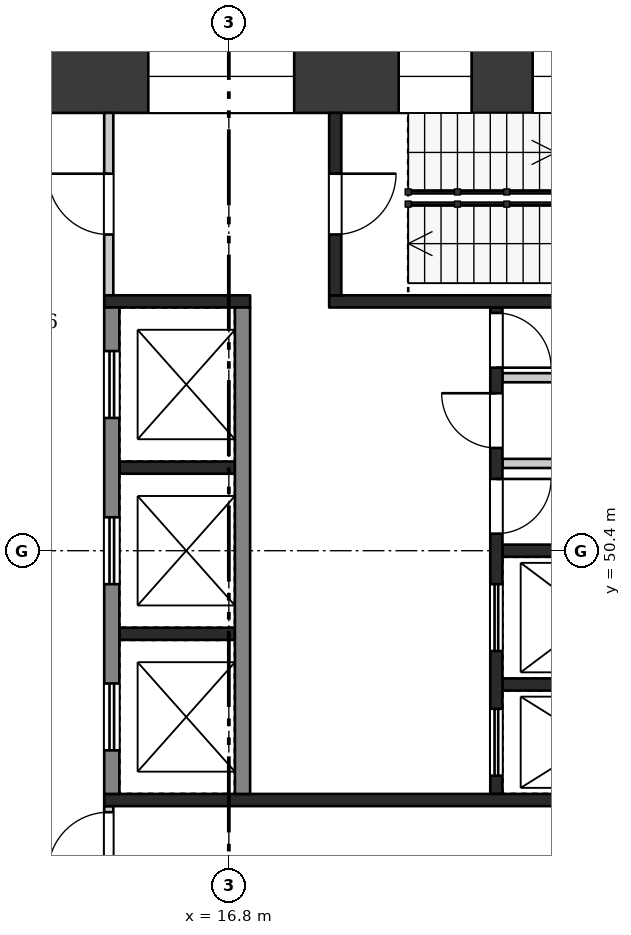
"""IFC4 building model, lengths in metres.
Left out: names, types, materials, properties, quantities, classifications, styles, units other than length and angle.
Written with IfcOpenShell. Run it as: python <this file> out.ifc"""

import sys

from ifc_helpers import new_model, si_unit, direction, frame, frame_2d, origin, place, context, subcontext, project, spatial, rectangle, extrude, element, fill, save


model = new_model("IFC4")
c1 = context("Model", 3, precision=1e-05, world=origin(), true_north=direction((0.0, 1.0)))
c2 = subcontext(c1, "Body", "Model", "MODEL_VIEW")
j1 = project(units=[si_unit("LENGTHUNIT", "METRE"), si_unit("PLANEANGLEUNIT", "RADIAN")], contexts=[c1])
p1 = place(None, origin())
s1 = spatial("IfcSite", under=j1, at=p1, CompositionType="ELEMENT")
p2 = place(p1, origin())
s2 = spatial("IfcBuilding", under=s1, at=p2, CompositionType="ELEMENT")
p3 = place(p2, frame((0.0, 0.0, 214.2)))
s3 = spatial("IfcBuildingStorey", under=s2, at=p3, CompositionType="ELEMENT", Elevation=214.2)
p4 = place(p3, frame((9.6, 58.2, 0.0), z_axis=(0.0, 0.0, 1.0), x_axis=(1.0, 0.0, 0.0)))
e1 = element("IfcWall", 1, at=p4, inside=s3, PredefinedType="SHEAR", context=c2, shape_type="SweptSolid", body=[
    extrude(rectangle(XDim=14.4, YDim=1.2, at=frame_2d((7.2, 0.0))), origin(), (0.0, 0.0, 1.0), 3.22),
])
p5 = place(p4, frame((1.105, 0.0, 0.6)))
e2 = element("IfcOpeningElement", 2, at=p5, cuts=e1, PredefinedType="OPENING", context=c2, shape_type="SweptSolid", body=[
    extrude(rectangle(XDim=3.0, YDim=2.1, at=frame_2d((1.5, 1.05))), frame((0.0, 0.61, 0.0), z_axis=(0.0, -1.0, 0.0), x_axis=(1.0, 0.0, 0.0)), (0.0, 0.0, 1.0), 1.22),
])
p6 = place(p4, frame((5.875, 0.0, 0.6)))
e3 = element("IfcOpeningElement", 3, at=p6, cuts=e1, PredefinedType="OPENING", context=c2, shape_type="SweptSolid", body=[
    extrude(rectangle(XDim=2.4, YDim=2.1, at=frame_2d((1.2, 1.05))), frame((0.0, 0.61, 0.0), z_axis=(0.0, -1.0, 0.0), x_axis=(1.0, 0.0, 0.0)), (0.0, 0.0, 1.0), 1.22),
])
p7 = place(p4, frame((9.993, 0.0, 0.5)))
e4 = element("IfcOpeningElement", 4, at=p7, cuts=e1, PredefinedType="OPENING", context=c2, shape_type="SweptSolid", body=[
    extrude(rectangle(XDim=1.2, YDim=2.4, at=frame_2d((0.6, 1.2))), frame((0.0, 0.61, 0.0), z_axis=(0.0, -1.0, 0.0), x_axis=(1.0, 0.0, 0.0)), (0.0, 0.0, 1.0), 1.22),
])
p8 = place(p4, frame((12.197, 0.0, 0.5)))
e5 = element("IfcOpeningElement", 5, at=p8, cuts=e1, PredefinedType="OPENING", context=c2, shape_type="SweptSolid", body=[
    extrude(rectangle(XDim=1.2, YDim=2.4, at=frame_2d((0.6, 1.2))), frame((0.0, 0.61, 0.0), z_axis=(0.0, -1.0, 0.0), x_axis=(1.0, 0.0, 0.0)), (0.0, 0.0, 1.0), 1.22),
])
for number, where, z_axis, x_axis in (
    (6, (15.0, 51.767, 0.0), (0.0, 0.0, 1.0), (1.0, 0.0, 0.0)),
    (7, (15.0, 49.033, 0.0), (0.0, 0.0, 1.0), (1.0, 0.0, 0.0)),
):
    element("IfcWall", number, at=place(p3, frame(where, z_axis=z_axis, x_axis=x_axis)), inside=s3, PredefinedType="SHEAR", context=c2, shape_type="SweptSolid", body=[
        extrude(rectangle(XDim=1.9, YDim=0.2, at=frame_2d((0.95, 0.0))), origin(), (0.0, 0.0, 1.0), 3.22),
    ])
p9 = place(p3, frame((14.875, 54.4, 0.0), z_axis=(0.0, 0.0, 1.0), x_axis=(0.0, -1.0, 0.0)))
e8 = element("IfcWall", 8, at=p9, inside=s3, PredefinedType="SHEAR", context=c2, shape_type="SweptSolid", body=[
    extrude(rectangle(XDim=8.0, YDim=0.25, at=frame_2d((4.0, 0.0))), origin(), (0.0, 0.0, 1.0), 3.22),
])
p10 = place(p9, frame((0.717, 0.0, 0.0)))
e9 = element("IfcOpeningElement", 9, at=p10, cuts=e8, PredefinedType="OPENING", context=c2, shape_type="SweptSolid", body=[
    extrude(rectangle(XDim=1.1, YDim=2.1, at=frame_2d((0.55, 1.05))), frame((0.0, 0.135, 0.0), z_axis=(0.0, -1.0, 0.0), x_axis=(1.0, 0.0, 0.0)), (0.0, 0.0, 1.0), 0.27),
])
p11 = place(p9, frame((3.45, 0.0, 0.0)))
e10 = element("IfcOpeningElement", 10, at=p11, cuts=e8, PredefinedType="OPENING", context=c2, shape_type="SweptSolid", body=[
    extrude(rectangle(XDim=1.1, YDim=2.1, at=frame_2d((0.55, 1.05))), frame((0.0, 0.135, 0.0), z_axis=(0.0, -1.0, 0.0), x_axis=(1.0, 0.0, 0.0)), (0.0, 0.0, 1.0), 0.27),
])
p12 = place(p9, frame((6.183, 0.0, 0.0)))
e11 = element("IfcOpeningElement", 11, at=p12, cuts=e8, PredefinedType="OPENING", context=c2, shape_type="SweptSolid", body=[
    extrude(rectangle(XDim=1.1, YDim=2.1, at=frame_2d((0.55, 1.05))), frame((0.0, 0.135, 0.0), z_axis=(0.0, -1.0, 0.0), x_axis=(1.0, 0.0, 0.0)), (0.0, 0.0, 1.0), 0.27),
])
p13 = place(p3, frame((17.025, 54.4, 0.0), z_axis=(0.0, 0.0, 1.0), x_axis=(0.0, -1.0, 0.0)))
e12 = element("IfcWall", 12, at=p13, inside=s3, PredefinedType="SHEAR", context=c2, shape_type="SweptSolid", body=[
    extrude(rectangle(XDim=8.0, YDim=0.25, at=frame_2d((4.0, 0.0))), origin(), (0.0, 0.0, 1.0), 3.22),
])
for number, where, z_axis, x_axis in (
    (13, (21.3, 50.4, 0.0), (0.0, 0.0, 1.0), (1.0, 0.0, 0.0)),
    (14, (21.3, 48.2, 0.0), (0.0, 0.0, 1.0), (1.0, 0.0, 0.0)),
):
    element("IfcWall", number, at=place(p3, frame(where, z_axis=z_axis, x_axis=x_axis)), inside=s3, PredefinedType="SHEAR", context=c2, shape_type="SweptSolid", body=[
        extrude(rectangle(XDim=2.7, YDim=0.2, at=frame_2d((1.35, 0.0))), origin(), (0.0, 0.0, 1.0), 3.22),
    ])
for number, where, z_axis, x_axis in (
    (15, (21.3, 53.245, 0.0), (0.0, 0.0, 1.0), (1.0, 0.0, 0.0)),
    (16, (21.3, 51.835, 0.0), (0.0, 0.0, 1.0), (1.0, 0.0, 0.0)),
):
    element("IfcWall", number, at=place(p3, frame(where, z_axis=z_axis, x_axis=x_axis)), inside=s3, PredefinedType="PARTITIONING", context=c2, shape_type="SweptSolid", body=[
        extrude(rectangle(XDim=2.7, YDim=0.15, at=frame_2d((1.35, 0.0))), origin(), (0.0, 0.0, 1.0), 3.22),
    ])
p14 = place(p3, frame((21.2, 54.4, 0.0), z_axis=(0.0, 0.0, 1.0), x_axis=(0.0, -1.0, 0.0)))
e17 = element("IfcWall", 17, at=p14, inside=s3, PredefinedType="SHEAR", context=c2, shape_type="SweptSolid", body=[
    extrude(rectangle(XDim=8.0, YDim=0.2, at=frame_2d((4.0, 0.0))), origin(), (0.0, 0.0, 1.0), 3.22),
])
p15 = place(p14, frame((0.09, 0.0, 0.0)))
e18 = element("IfcOpeningElement", 18, at=p15, cuts=e17, PredefinedType="OPENING", context=c2, shape_type="SweptSolid", body=[
    extrude(rectangle(XDim=0.9, YDim=2.1, at=frame_2d((0.45, 1.05))), frame((0.0, 0.11, 0.0), z_axis=(0.0, -1.0, 0.0), x_axis=(1.0, 0.0, 0.0)), (0.0, 0.0, 1.0), 0.22),
])
p16 = place(p14, frame((1.41, 0.0, 0.0)))
e19 = element("IfcOpeningElement", 19, at=p16, cuts=e17, PredefinedType="OPENING", context=c2, shape_type="SweptSolid", body=[
    extrude(rectangle(XDim=0.9, YDim=2.1, at=frame_2d((0.45, 1.05))), frame((0.0, 0.11, 0.0), z_axis=(0.0, -1.0, 0.0), x_axis=(1.0, 0.0, 0.0)), (0.0, 0.0, 1.0), 0.22),
])
p17 = place(p14, frame((2.82, 0.0, 0.0)))
e20 = element("IfcOpeningElement", 20, at=p17, cuts=e17, PredefinedType="OPENING", context=c2, shape_type="SweptSolid", body=[
    extrude(rectangle(XDim=0.9, YDim=2.1, at=frame_2d((0.45, 1.05))), frame((0.0, 0.11, 0.0), z_axis=(0.0, -1.0, 0.0), x_axis=(1.0, 0.0, 0.0)), (0.0, 0.0, 1.0), 0.22),
])
p18 = place(p14, frame((4.55, 0.0, 0.0)))
e21 = element("IfcOpeningElement", 21, at=p18, cuts=e17, PredefinedType="OPENING", context=c2, shape_type="SweptSolid", body=[
    extrude(rectangle(XDim=1.1, YDim=2.1, at=frame_2d((0.55, 1.05))), frame((0.0, 0.11, 0.0), z_axis=(0.0, -1.0, 0.0), x_axis=(1.0, 0.0, 0.0)), (0.0, 0.0, 1.0), 0.22),
])
p19 = place(p14, frame((6.6, 0.0, 0.0)))
e22 = element("IfcOpeningElement", 22, at=p19, cuts=e17, PredefinedType="OPENING", context=c2, shape_type="SweptSolid", body=[
    extrude(rectangle(XDim=1.1, YDim=2.1, at=frame_2d((0.55, 1.05))), frame((0.0, 0.11, 0.0), z_axis=(0.0, -1.0, 0.0), x_axis=(1.0, 0.0, 0.0)), (0.0, 0.0, 1.0), 0.22),
])
p20 = place(p3, frame((14.75, 54.5, 0.0), z_axis=(0.0, 0.0, 1.0), x_axis=(1.0, 0.0, 0.0)))
e23 = element("IfcWall", 23, at=p20, inside=s3, PredefinedType="SHEAR", context=c2, shape_type="SweptSolid", body=[
    extrude(rectangle(XDim=2.4, YDim=0.2, at=frame_2d((1.2, 0.0))), origin(), (0.0, 0.0, 1.0), 3.22),
])
p21 = place(p3, frame((18.45, 54.5, 0.0), z_axis=(0.0, 0.0, 1.0), x_axis=(1.0, 0.0, 0.0)))
e24 = element("IfcWall", 24, at=p21, inside=s3, PredefinedType="SHEAR", context=c2, shape_type="SweptSolid", body=[
    extrude(rectangle(XDim=5.55, YDim=0.2, at=frame_2d((2.775, 0.0))), origin(), (0.0, 0.0, 1.0), 3.22),
])
p22 = place(p3, frame((14.825, 57.6, 0.0), z_axis=(0.0, 0.0, 1.0), x_axis=(0.0, -1.0, 0.0)))
e25 = element("IfcWall", 25, at=p22, inside=s3, PredefinedType="PARTITIONING", context=c2, shape_type="SweptSolid", body=[
    extrude(rectangle(XDim=3.0, YDim=0.15, at=frame_2d((1.5, 0.0))), origin(), (0.0, 0.0, 1.0), 3.22),
])
p23 = place(p22, frame((1.0, 0.0, 0.0)))
e26 = element("IfcOpeningElement", 26, at=p23, cuts=e25, PredefinedType="OPENING", context=c2, shape_type="SweptSolid", body=[
    extrude(rectangle(XDim=1.0, YDim=2.1, at=frame_2d((0.5, 1.05))), frame((0.0, 0.085, 0.0), z_axis=(0.0, -1.0, 0.0), x_axis=(1.0, 0.0, 0.0)), (0.0, 0.0, 1.0), 0.17),
])
p24 = place(p3, frame((18.55, 57.6, 0.0), z_axis=(0.0, 0.0, 1.0), x_axis=(0.0, -1.0, 0.0)))
e27 = element("IfcWall", 27, at=p24, inside=s3, PredefinedType="SHEAR", context=c2, shape_type="SweptSolid", body=[
    extrude(rectangle(XDim=3.0, YDim=0.2, at=frame_2d((1.5, 0.0))), origin(), (0.0, 0.0, 1.0), 3.22),
])
p25 = place(p24, frame((1.0, 0.0, 0.0)))
e28 = element("IfcOpeningElement", 28, at=p25, cuts=e27, PredefinedType="OPENING", context=c2, shape_type="SweptSolid", body=[
    extrude(rectangle(XDim=1.0, YDim=2.1, at=frame_2d((0.5, 1.05))), frame((0.0, 0.11, 0.0), z_axis=(0.0, -1.0, 0.0), x_axis=(1.0, 0.0, 0.0)), (0.0, 0.0, 1.0), 0.22),
])
p26 = place(p3, frame((14.75, 46.3, 0.0), z_axis=(0.0, 0.0, 1.0), x_axis=(1.0, 0.0, 0.0)))
e29 = element("IfcWall", 29, at=p26, inside=s3, PredefinedType="SHEAR", context=c2, shape_type="SweptSolid", body=[
    extrude(rectangle(XDim=9.25, YDim=0.2, at=frame_2d((4.625, 0.0))), origin(), (0.0, 0.0, 1.0), 3.22),
])
p27 = place(p3, frame((14.825, 46.2, 0.0), z_axis=(0.0, 0.0, 1.0), x_axis=(0.0, -1.0, 0.0)))
e30 = element("IfcWall", 30, at=p27, inside=s3, PredefinedType="PARTITIONING", context=c2, shape_type="SweptSolid", body=[
    extrude(rectangle(XDim=3.0, YDim=0.15, at=frame_2d((1.5, 0.0))), origin(), (0.0, 0.0, 1.0), 3.22),
])
p28 = place(p27, frame((0.1, 0.0, 0.0)))
e31 = element("IfcOpeningElement", 31, at=p28, cuts=e30, PredefinedType="OPENING", context=c2, shape_type="SweptSolid", body=[
    extrude(rectangle(XDim=1.0, YDim=2.1, at=frame_2d((0.5, 1.05))), frame((0.0, 0.085, 0.0), z_axis=(0.0, -1.0, 0.0), x_axis=(1.0, 0.0, 0.0)), (0.0, 0.0, 1.0), 0.17),
])
p29 = place(p10, origin())
e32 = element("IfcDoor", 32, at=p29, inside=s3, OperationType="DOUBLE_DOOR_SLIDING", PredefinedType="DOOR", context=c2, shape_type="SweptSolid", body=[
    extrude(rectangle(XDim=1.1, YDim=2.1, at=frame_2d((0.55, 1.05))), frame((0.0, 0.025, 0.0), z_axis=(0.0, -1.0, 0.0), x_axis=(1.0, 0.0, 0.0)), (0.0, 0.0, 1.0), 0.05),
])
fill(e9, e32)
p30 = place(p11, origin())
e33 = element("IfcDoor", 33, at=p30, inside=s3, OperationType="DOUBLE_DOOR_SLIDING", PredefinedType="DOOR", context=c2, shape_type="SweptSolid", body=[
    extrude(rectangle(XDim=1.1, YDim=2.1, at=frame_2d((0.55, 1.05))), frame((0.0, 0.025, 0.0), z_axis=(0.0, -1.0, 0.0), x_axis=(1.0, 0.0, 0.0)), (0.0, 0.0, 1.0), 0.05),
])
fill(e10, e33)
p31 = place(p12, origin())
e34 = element("IfcDoor", 34, at=p31, inside=s3, OperationType="DOUBLE_DOOR_SLIDING", PredefinedType="DOOR", context=c2, shape_type="SweptSolid", body=[
    extrude(rectangle(XDim=1.1, YDim=2.1, at=frame_2d((0.55, 1.05))), frame((0.0, 0.025, 0.0), z_axis=(0.0, -1.0, 0.0), x_axis=(1.0, 0.0, 0.0)), (0.0, 0.0, 1.0), 0.05),
])
fill(e11, e34)
p32 = place(p15, origin())
e35 = element("IfcDoor", 35, at=p32, inside=s3, OperationType="SINGLE_SWING_RIGHT", PredefinedType="DOOR", context=c2, shape_type="SweptSolid", body=[
    extrude(rectangle(XDim=0.9, YDim=2.1, at=frame_2d((0.45, 1.05))), frame((0.0, 0.025, 0.0), z_axis=(0.0, -1.0, 0.0), x_axis=(1.0, 0.0, 0.0)), (0.0, 0.0, 1.0), 0.05),
])
fill(e18, e35)
p33 = place(p16, frame((0.9, 0.0, 0.0), z_axis=(0.0, 0.0, 1.0), x_axis=(-1.0, 0.0, 0.0)))
e36 = element("IfcDoor", 36, at=p33, inside=s3, OperationType="SINGLE_SWING_RIGHT", PredefinedType="DOOR", context=c2, shape_type="SweptSolid", body=[
    extrude(rectangle(XDim=0.9, YDim=2.1, at=frame_2d((0.45, 1.05))), frame((0.0, 0.025, 0.0), z_axis=(0.0, -1.0, 0.0), x_axis=(1.0, 0.0, 0.0)), (0.0, 0.0, 1.0), 0.05),
])
fill(e19, e36)
p34 = place(p17, origin())
e37 = element("IfcDoor", 37, at=p34, inside=s3, OperationType="SINGLE_SWING_LEFT", PredefinedType="DOOR", context=c2, shape_type="SweptSolid", body=[
    extrude(rectangle(XDim=0.9, YDim=2.1, at=frame_2d((0.45, 1.05))), frame((0.0, 0.025, 0.0), z_axis=(0.0, -1.0, 0.0), x_axis=(1.0, 0.0, 0.0)), (0.0, 0.0, 1.0), 0.05),
])
fill(e20, e37)
p35 = place(p18, origin())
e38 = element("IfcDoor", 38, at=p35, inside=s3, OperationType="DOUBLE_DOOR_SLIDING", PredefinedType="DOOR", context=c2, shape_type="SweptSolid", body=[
    extrude(rectangle(XDim=1.1, YDim=2.1, at=frame_2d((0.55, 1.05))), frame((0.0, 0.025, 0.0), z_axis=(0.0, -1.0, 0.0), x_axis=(1.0, 0.0, 0.0)), (0.0, 0.0, 1.0), 0.05),
])
fill(e21, e38)
p36 = place(p19, origin())
e39 = element("IfcDoor", 39, at=p36, inside=s3, OperationType="DOUBLE_DOOR_SLIDING", PredefinedType="DOOR", context=c2, shape_type="SweptSolid", body=[
    extrude(rectangle(XDim=1.1, YDim=2.1, at=frame_2d((0.55, 1.05))), frame((0.0, 0.025, 0.0), z_axis=(0.0, -1.0, 0.0), x_axis=(1.0, 0.0, 0.0)), (0.0, 0.0, 1.0), 0.05),
])
fill(e22, e39)
p37 = place(p23, frame((1.0, 0.0, 0.0), z_axis=(0.0, 0.0, 1.0), x_axis=(-1.0, 0.0, 0.0)))
e40 = element("IfcDoor", 40, at=p37, inside=s3, OperationType="SINGLE_SWING_RIGHT", PredefinedType="DOOR", context=c2, shape_type="SweptSolid", body=[
    extrude(rectangle(XDim=1.0, YDim=2.1, at=frame_2d((0.5, 1.05))), frame((0.0, 0.025, 0.0), z_axis=(0.0, -1.0, 0.0), x_axis=(1.0, 0.0, 0.0)), (0.0, 0.0, 1.0), 0.05),
])
fill(e26, e40)
p38 = place(p25, origin())
e41 = element("IfcDoor", 41, at=p38, inside=s3, OperationType="SINGLE_SWING_LEFT", PredefinedType="DOOR", context=c2, shape_type="SweptSolid", body=[
    extrude(rectangle(XDim=1.0, YDim=2.1, at=frame_2d((0.5, 1.05))), frame((0.0, 0.025, 0.0), z_axis=(0.0, -1.0, 0.0), x_axis=(1.0, 0.0, 0.0)), (0.0, 0.0, 1.0), 0.05),
])
fill(e28, e41)
p39 = place(p28, frame((1.0, 0.0, 0.0), z_axis=(0.0, 0.0, 1.0), x_axis=(-1.0, 0.0, 0.0)))
e42 = element("IfcDoor", 42, at=p39, inside=s3, OperationType="SINGLE_SWING_LEFT", PredefinedType="DOOR", context=c2, shape_type="SweptSolid", body=[
    extrude(rectangle(XDim=1.0, YDim=2.1, at=frame_2d((0.5, 1.05))), frame((0.0, 0.025, 0.0), z_axis=(0.0, -1.0, 0.0), x_axis=(1.0, 0.0, 0.0)), (0.0, 0.0, 1.0), 0.05),
])
fill(e31, e42)
p40 = place(p6, origin())
e43 = element("IfcWindow", 43, at=p40, inside=s3, PartitioningType="SINGLE_PANEL", PredefinedType="WINDOW", context=c2, shape_type="SweptSolid", body=[
    extrude(rectangle(XDim=2.4, YDim=2.1, at=frame_2d((1.2, 1.05))), frame((0.0, 0.03, 0.0), z_axis=(0.0, -1.0, 0.0), x_axis=(1.0, 0.0, 0.0)), (0.0, 0.0, 1.0), 0.06),
])
fill(e3, e43)
p41 = place(p7, origin())
e44 = element("IfcWindow", 44, at=p41, inside=s3, PartitioningType="SINGLE_PANEL", PredefinedType="WINDOW", context=c2, shape_type="SweptSolid", body=[
    extrude(rectangle(XDim=1.2, YDim=2.4, at=frame_2d((0.6, 1.2))), frame((0.0, 0.03, 0.0), z_axis=(0.0, -1.0, 0.0), x_axis=(1.0, 0.0, 0.0)), (0.0, 0.0, 1.0), 0.06),
])
fill(e4, e44)
p42 = place(p8, origin())
e45 = element("IfcWindow", 45, at=p42, inside=s3, PartitioningType="SINGLE_PANEL", PredefinedType="WINDOW", context=c2, shape_type="SweptSolid", body=[
    extrude(rectangle(XDim=1.2, YDim=2.4, at=frame_2d((0.6, 1.2))), frame((0.0, 0.03, 0.0), z_axis=(0.0, -1.0, 0.0), x_axis=(1.0, 0.0, 0.0)), (0.0, 0.0, 1.0), 0.06),
])
fill(e5, e45)
save(model, sys.argv[1])
